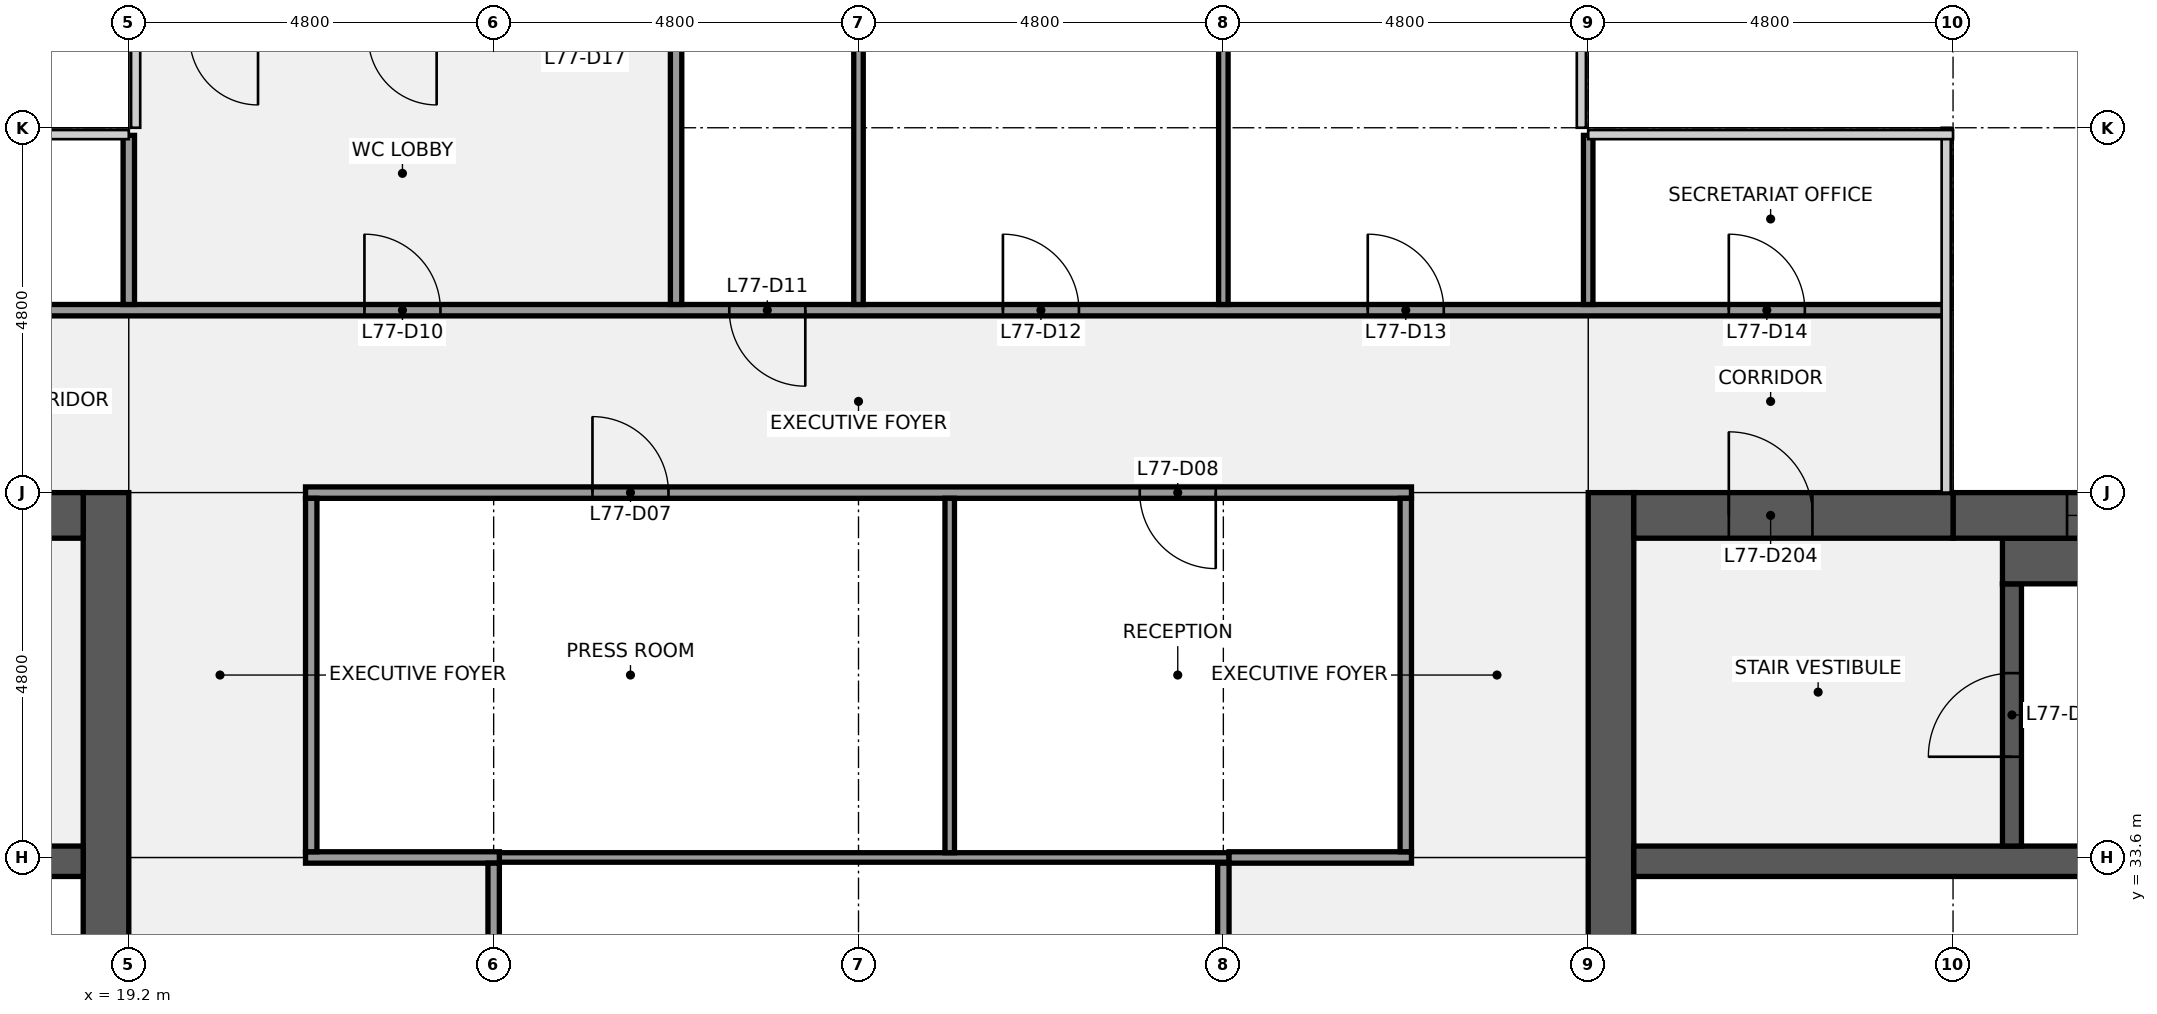
"""IFC4 building model, lengths in metres.
Left out: names, types, materials, properties, quantities, classifications, styles, units other than length and angle.
Written with IfcOpenShell. Run it as: python <this file> out.ifc"""

import sys

from ifc_helpers import new_model, si_unit, direction, frame, frame_2d, origin, place, context, subcontext, project, spatial, rectangle, extrude, element, fill, save


model = new_model("IFC4")
c1 = context("Model", 3, precision=1e-05, world=origin(), true_north=direction((0.0, 1.0)))
c2 = subcontext(c1, "Body", "Model", "MODEL_VIEW")
j1 = project(units=[si_unit("LENGTHUNIT", "METRE"), si_unit("PLANEANGLEUNIT", "RADIAN")], contexts=[c1])
p1 = place(None, origin())
s1 = spatial("IfcSite", under=j1, at=p1, CompositionType="ELEMENT")
p2 = place(p1, origin())
s2 = spatial("IfcBuilding", under=s1, at=p2, CompositionType="ELEMENT")
p3 = place(p2, frame((0.0, 0.0, 346.3)))
s3 = spatial("IfcBuildingStorey", under=s2, at=p3, CompositionType="ELEMENT", Elevation=346.3)
p4 = place(p3, frame((18.9, 38.4, 0.0), z_axis=(0.0, 0.0, 1.0), x_axis=(0.0, -1.0, 0.0)))
e1 = element("IfcWall", 1, at=p4, inside=s3, PredefinedType="SHEAR", context=c2, shape_type="SweptSolid", body=[
    extrude(rectangle(XDim=28.8, YDim=0.6, at=frame_2d((14.4, 0.0))), origin(), (0.0, 0.0, 1.0), 3.84),
])
p5 = place(p4, frame((18.3, 0.0, 0.0)))
e2 = element("IfcOpeningElement", 2, at=p5, cuts=e1, PredefinedType="OPENING", context=c2, shape_type="SweptSolid", body=[
    extrude(rectangle(XDim=1.8, YDim=2.1, at=frame_2d((0.9, 1.05))), frame((0.0, 0.31, 0.0), z_axis=(0.0, -1.0, 0.0), x_axis=(1.0, 0.0, 0.0)), (0.0, 0.0, 1.0), 0.62),
])
p6 = place(p4, frame((8.7, 0.0, 0.0)))
e3 = element("IfcOpeningElement", 3, at=p6, cuts=e1, PredefinedType="OPENING", context=c2, shape_type="SweptSolid", body=[
    extrude(rectangle(XDim=1.8, YDim=2.1, at=frame_2d((0.9, 1.05))), frame((0.0, 0.31, 0.0), z_axis=(0.0, -1.0, 0.0), x_axis=(1.0, 0.0, 0.0)), (0.0, 0.0, 1.0), 0.62),
])
p7 = place(p3, frame((0.6, 33.55, 0.0), z_axis=(0.0, 0.0, 1.0), x_axis=(1.0, 0.0, 0.0)))
e4 = element("IfcWall", 4, at=p7, inside=s3, PredefinedType="SHEAR", context=c2, shape_type="SweptSolid", body=[
    extrude(rectangle(XDim=18.0, YDim=0.4, at=frame_2d((9.0, 0.0))), origin(), (0.0, 0.0, 1.0), 3.84),
])
p8 = place(p3, frame((14.4, 38.1, 0.0), z_axis=(0.0, 0.0, 1.0), x_axis=(1.0, 0.0, 0.0)))
e5 = element("IfcWall", 5, at=p8, inside=s3, PredefinedType="SHEAR", context=c2, shape_type="SweptSolid", body=[
    extrude(rectangle(XDim=4.2, YDim=0.6, at=frame_2d((2.1, 0.0))), origin(), (0.0, 0.0, 1.0), 3.84),
])
p9 = place(p8, frame((1.85, 0.0, 0.0)))
e6 = element("IfcOpeningElement", 6, at=p9, cuts=e5, PredefinedType="OPENING", context=c2, shape_type="SweptSolid", body=[
    extrude(rectangle(XDim=1.1, YDim=2.1, at=frame_2d((0.55, 1.05))), frame((0.0, 0.31, 0.0), z_axis=(0.0, -1.0, 0.0), x_axis=(1.0, 0.0, 0.0)), (0.0, 0.0, 1.0), 0.62),
])
p10 = place(p3, frame((38.7, 9.6, 0.0), z_axis=(0.0, 0.0, 1.0), x_axis=(0.0, 1.0, 0.0)))
e7 = element("IfcWall", 7, at=p10, inside=s3, PredefinedType="SHEAR", context=c2, shape_type="SweptSolid", body=[
    extrude(rectangle(XDim=28.8, YDim=0.6, at=frame_2d((14.4, 0.0))), origin(), (0.0, 0.0, 1.0), 3.84),
])
p11 = place(p10, frame((8.7, 0.0, 0.0)))
e8 = element("IfcOpeningElement", 8, at=p11, cuts=e7, PredefinedType="OPENING", context=c2, shape_type="SweptSolid", body=[
    extrude(rectangle(XDim=1.8, YDim=2.1, at=frame_2d((0.9, 1.05))), frame((0.0, 0.31, 0.0), z_axis=(0.0, -1.0, 0.0), x_axis=(1.0, 0.0, 0.0)), (0.0, 0.0, 1.0), 0.62),
])
p12 = place(p10, frame((18.3, 0.0, 0.0)))
e9 = element("IfcOpeningElement", 9, at=p12, cuts=e7, PredefinedType="OPENING", context=c2, shape_type="SweptSolid", body=[
    extrude(rectangle(XDim=1.8, YDim=2.1, at=frame_2d((0.9, 1.05))), frame((0.0, 0.31, 0.0), z_axis=(0.0, -1.0, 0.0), x_axis=(1.0, 0.0, 0.0)), (0.0, 0.0, 1.0), 0.62),
])
p13 = place(p3, frame((39.0, 33.55, 0.0), z_axis=(0.0, 0.0, 1.0), x_axis=(1.0, 0.0, 0.0)))
e10 = element("IfcWall", 10, at=p13, inside=s3, PredefinedType="SHEAR", context=c2, shape_type="SweptSolid", body=[
    extrude(rectangle(XDim=18.0, YDim=0.4, at=frame_2d((9.0, 0.0))), origin(), (0.0, 0.0, 1.0), 3.84),
])
p14 = place(p3, frame((43.975, 33.75, 0.0), z_axis=(0.0, 0.0, 1.0), x_axis=(0.0, 1.0, 0.0)))
e11 = element("IfcWall", 11, at=p14, inside=s3, PredefinedType="SHEAR", context=c2, shape_type="SweptSolid", body=[
    extrude(rectangle(XDim=3.45, YDim=0.25, at=frame_2d((1.725, 0.0))), origin(), (0.0, 0.0, 1.0), 3.84),
])
p15 = place(p14, frame((1.175, 0.0, 0.0)))
e12 = element("IfcOpeningElement", 12, at=p15, cuts=e11, PredefinedType="OPENING", context=c2, shape_type="SweptSolid", body=[
    extrude(rectangle(XDim=1.1, YDim=2.1, at=frame_2d((0.55, 1.05))), frame((0.0, 0.135, 0.0), z_axis=(0.0, -1.0, 0.0), x_axis=(1.0, 0.0, 0.0)), (0.0, 0.0, 1.0), 0.27),
])
p16 = place(p3, frame((43.85, 37.5, 0.0), z_axis=(0.0, 0.0, 1.0), x_axis=(1.0, 0.0, 0.0)))
e13 = element("IfcWall", 13, at=p16, inside=s3, PredefinedType="SHEAR", context=c2, shape_type="SweptSolid", body=[
    extrude(rectangle(XDim=7.5, YDim=0.6, at=frame_2d((3.75, 0.0))), origin(), (0.0, 0.0, 1.0), 3.84),
])
p17 = place(p3, frame((43.2, 38.1, 0.0), z_axis=(0.0, 0.0, 1.0), x_axis=(1.0, 0.0, 0.0)))
e14 = element("IfcWall", 14, at=p17, inside=s3, PredefinedType="SHEAR", context=c2, shape_type="SweptSolid", body=[
    extrude(rectangle(XDim=13.8, YDim=0.6, at=frame_2d((6.9, 0.0))), origin(), (0.0, 0.0, 1.0), 3.84),
])
p18 = place(p17, frame((6.3, 0.0, 0.9)))
e15 = element("IfcOpeningElement", 15, at=p18, cuts=e14, PredefinedType="OPENING", context=c2, shape_type="SweptSolid", body=[
    extrude(rectangle(XDim=1.8, YDim=1.5, at=frame_2d((0.9, 0.75))), frame((0.0, 0.31, 0.0), z_axis=(0.0, -1.0, 0.0), x_axis=(1.0, 0.0, 0.0)), (0.0, 0.0, 1.0), 0.62),
])
p19 = place(p17, frame((1.5, 0.0, 0.9)))
e16 = element("IfcOpeningElement", 16, at=p19, cuts=e14, PredefinedType="OPENING", context=c2, shape_type="SweptSolid", body=[
    extrude(rectangle(XDim=1.8, YDim=1.5, at=frame_2d((0.9, 0.75))), frame((0.0, 0.31, 0.0), z_axis=(0.0, -1.0, 0.0), x_axis=(1.0, 0.0, 0.0)), (0.0, 0.0, 1.0), 0.62),
])
p20 = place(p3, frame((39.0, 38.1, 0.0), z_axis=(0.0, 0.0, 1.0), x_axis=(1.0, 0.0, 0.0)))
e17 = element("IfcWall", 17, at=p20, inside=s3, PredefinedType="SHEAR", context=c2, shape_type="SweptSolid", body=[
    extrude(rectangle(XDim=4.2, YDim=0.6, at=frame_2d((2.1, 0.0))), origin(), (0.0, 0.0, 1.0), 3.84),
])
p21 = place(p20, frame((1.25, 0.0, 0.0)))
e18 = element("IfcOpeningElement", 18, at=p21, cuts=e17, PredefinedType="OPENING", context=c2, shape_type="SweptSolid", body=[
    extrude(rectangle(XDim=1.1, YDim=2.1, at=frame_2d((0.55, 1.05))), frame((0.0, 0.31, 0.0), z_axis=(0.0, -1.0, 0.0), x_axis=(1.0, 0.0, 0.0)), (0.0, 0.0, 1.0), 0.62),
])
p22 = place(p3, frame((24.075, 33.6, 0.0), z_axis=(0.0, 0.0, 1.0), x_axis=(1.0, 0.0, 0.0)))
e19 = element("IfcWall", 19, at=p22, inside=s3, PredefinedType="PARTITIONING", context=c2, shape_type="SweptSolid", body=[
    extrude(rectangle(XDim=9.6, YDim=0.125, at=frame_2d((4.8, 0.0))), origin(), (0.0, 0.0, 1.0), 2.849),
])
p23 = place(p3, frame((21.525, 33.6, 0.0), z_axis=(0.0, 0.0, 1.0), x_axis=(1.0, 0.0, 0.0)))
e20 = element("IfcWall", 20, at=p23, inside=s3, PredefinedType="PARTITIONING", context=c2, shape_type="SweptSolid", body=[
    extrude(rectangle(XDim=2.55, YDim=0.15, at=frame_2d((1.275, 0.0))), origin(), (0.0, 0.0, 1.0), 2.849),
])
p24 = place(p3, frame((33.675, 33.6, 0.0), z_axis=(0.0, 0.0, 1.0), x_axis=(1.0, 0.0, 0.0)))
e21 = element("IfcWall", 21, at=p24, inside=s3, PredefinedType="PARTITIONING", context=c2, shape_type="SweptSolid", body=[
    extrude(rectangle(XDim=2.4, YDim=0.15, at=frame_2d((1.2, 0.0))), origin(), (0.0, 0.0, 1.0), 2.849),
])
p25 = place(p3, frame((21.525, 38.4, 0.0), z_axis=(0.0, 0.0, 1.0), x_axis=(1.0, 0.0, 0.0)))
e22 = element("IfcWall", 22, at=p25, inside=s3, PredefinedType="PARTITIONING", context=c2, shape_type="SweptSolid", body=[
    extrude(rectangle(XDim=14.55, YDim=0.15, at=frame_2d((7.275, 0.0))), origin(), (0.0, 0.0, 1.0), 2.849),
])
p26 = place(p25, frame((3.775, 0.0, 0.0)))
e23 = element("IfcOpeningElement", 23, at=p26, cuts=e22, PredefinedType="OPENING", context=c2, shape_type="SweptSolid", body=[
    extrude(rectangle(XDim=1.0, YDim=2.1, at=frame_2d((0.5, 1.05))), frame((0.0, 0.085, 0.0), z_axis=(0.0, -1.0, 0.0), x_axis=(1.0, 0.0, 0.0)), (0.0, 0.0, 1.0), 0.17),
])
p27 = place(p25, frame((10.975, 0.0, 0.0)))
e24 = element("IfcOpeningElement", 24, at=p27, cuts=e22, PredefinedType="OPENING", context=c2, shape_type="SweptSolid", body=[
    extrude(rectangle(XDim=1.0, YDim=2.1, at=frame_2d((0.5, 1.05))), frame((0.0, 0.085, 0.0), z_axis=(0.0, -1.0, 0.0), x_axis=(1.0, 0.0, 0.0)), (0.0, 0.0, 1.0), 0.17),
])
p28 = place(p3, frame((14.5, 40.8, 0.0), z_axis=(0.0, 0.0, 1.0), x_axis=(1.0, 0.0, 0.0)))
e25 = element("IfcWall", 25, at=p28, inside=s3, PredefinedType="PARTITIONING", context=c2, shape_type="SweptSolid", body=[
    extrude(rectangle(XDim=28.6, YDim=0.15, at=frame_2d((14.3, 0.0))), origin(), (0.0, 0.0, 1.0), 2.849),
])
p29 = place(p28, frame((1.85, 0.0, 0.0)))
e26 = element("IfcOpeningElement", 26, at=p29, cuts=e25, PredefinedType="OPENING", context=c2, shape_type="SweptSolid", body=[
    extrude(rectangle(XDim=1.0, YDim=2.1, at=frame_2d((0.5, 1.05))), frame((0.0, 0.085, 0.0), z_axis=(0.0, -1.0, 0.0), x_axis=(1.0, 0.0, 0.0)), (0.0, 0.0, 1.0), 0.17),
])
p30 = place(p28, frame((7.8, 0.0, 0.0)))
e27 = element("IfcOpeningElement", 27, at=p30, cuts=e25, PredefinedType="OPENING", context=c2, shape_type="SweptSolid", body=[
    extrude(rectangle(XDim=1.0, YDim=2.1, at=frame_2d((0.5, 1.05))), frame((0.0, 0.085, 0.0), z_axis=(0.0, -1.0, 0.0), x_axis=(1.0, 0.0, 0.0)), (0.0, 0.0, 1.0), 0.17),
])
p31 = place(p28, frame((12.6, 0.0, 0.0)))
e28 = element("IfcOpeningElement", 28, at=p31, cuts=e25, PredefinedType="OPENING", context=c2, shape_type="SweptSolid", body=[
    extrude(rectangle(XDim=1.0, YDim=2.1, at=frame_2d((0.5, 1.05))), frame((0.0, 0.085, 0.0), z_axis=(0.0, -1.0, 0.0), x_axis=(1.0, 0.0, 0.0)), (0.0, 0.0, 1.0), 0.17),
])
p32 = place(p28, frame((16.2, 0.0, 0.0)))
e29 = element("IfcOpeningElement", 29, at=p32, cuts=e25, PredefinedType="OPENING", context=c2, shape_type="SweptSolid", body=[
    extrude(rectangle(XDim=1.0, YDim=2.1, at=frame_2d((0.5, 1.05))), frame((0.0, 0.085, 0.0), z_axis=(0.0, -1.0, 0.0), x_axis=(1.0, 0.0, 0.0)), (0.0, 0.0, 1.0), 0.17),
])
p33 = place(p28, frame((21.0, 0.0, 0.0)))
e30 = element("IfcOpeningElement", 30, at=p33, cuts=e25, PredefinedType="OPENING", context=c2, shape_type="SweptSolid", body=[
    extrude(rectangle(XDim=1.0, YDim=2.1, at=frame_2d((0.5, 1.05))), frame((0.0, 0.085, 0.0), z_axis=(0.0, -1.0, 0.0), x_axis=(1.0, 0.0, 0.0)), (0.0, 0.0, 1.0), 0.17),
])
p34 = place(p28, frame((25.75, 0.0, 0.0)))
e31 = element("IfcOpeningElement", 31, at=p34, cuts=e25, PredefinedType="OPENING", context=c2, shape_type="SweptSolid", body=[
    extrude(rectangle(XDim=1.0, YDim=2.1, at=frame_2d((0.5, 1.05))), frame((0.0, 0.085, 0.0), z_axis=(0.0, -1.0, 0.0), x_axis=(1.0, 0.0, 0.0)), (0.0, 0.0, 1.0), 0.17),
])
p35 = place(p3, frame((19.2, 40.875, 0.0), z_axis=(0.0, 0.0, 1.0), x_axis=(0.0, 1.0, 0.0)))
e32 = element("IfcWall", 32, at=p35, inside=s3, PredefinedType="PARTITIONING", context=c2, shape_type="SweptSolid", body=[
    extrude(rectangle(XDim=2.225, YDim=0.15, at=frame_2d((1.113, 0.0))), origin(), (0.0, 0.0, 1.0), 2.849),
])
p36 = place(p3, frame((21.6, 33.675, 0.0), z_axis=(0.0, 0.0, 1.0), x_axis=(0.0, 1.0, 0.0)))
e33 = element("IfcWall", 33, at=p36, inside=s3, PredefinedType="PARTITIONING", context=c2, shape_type="SweptSolid", body=[
    extrude(rectangle(XDim=4.65, YDim=0.15, at=frame_2d((2.325, 0.0))), origin(), (0.0, 0.0, 1.0), 2.849),
])
p37 = place(p3, frame((24.0, 24.075, 0.0), z_axis=(0.0, 0.0, 1.0), x_axis=(0.0, 1.0, 0.0)))
e34 = element("IfcWall", 34, at=p37, inside=s3, PredefinedType="PARTITIONING", context=c2, shape_type="SweptSolid", body=[
    extrude(rectangle(XDim=9.45, YDim=0.15, at=frame_2d((4.725, 0.0))), origin(), (0.0, 0.0, 1.0), 2.849),
])
p38 = place(p37, frame((4.225, 0.0, 0.0)))
e35 = element("IfcOpeningElement", 35, at=p38, cuts=e34, PredefinedType="OPENING", context=c2, shape_type="SweptSolid", body=[
    extrude(rectangle(XDim=1.0, YDim=2.1, at=frame_2d((0.5, 1.05))), frame((0.0, 0.085, 0.0), z_axis=(0.0, -1.0, 0.0), x_axis=(1.0, 0.0, 0.0)), (0.0, 0.0, 1.0), 0.17),
])
p39 = place(p3, frame((26.4, 40.875, 0.0), z_axis=(0.0, 0.0, 1.0), x_axis=(0.0, 1.0, 0.0)))
e36 = element("IfcWall", 36, at=p39, inside=s3, PredefinedType="PARTITIONING", context=c2, shape_type="SweptSolid", body=[
    extrude(rectangle(XDim=3.45, YDim=0.15, at=frame_2d((1.725, 0.0))), origin(), (0.0, 0.0, 1.0), 2.849),
])
p40 = place(p3, frame((28.8, 40.875, 0.0), z_axis=(0.0, 0.0, 1.0), x_axis=(0.0, 1.0, 0.0)))
e37 = element("IfcWall", 37, at=p40, inside=s3, PredefinedType="PARTITIONING", context=c2, shape_type="SweptSolid", body=[
    extrude(rectangle(XDim=6.625, YDim=0.125, at=frame_2d((3.312, 0.0))), origin(), (0.0, 0.0, 1.0), 2.849),
])
p41 = place(p3, frame((30.0, 33.663, 0.0), z_axis=(0.0, 0.0, 1.0), x_axis=(0.0, 1.0, 0.0)))
e38 = element("IfcWall", 38, at=p41, inside=s3, PredefinedType="PARTITIONING", context=c2, shape_type="SweptSolid", body=[
    extrude(rectangle(XDim=4.662, YDim=0.125, at=frame_2d((2.331, 0.0))), origin(), (0.0, 0.0, 1.0), 2.849),
])
p42 = place(p3, frame((33.6, 40.875, 0.0), z_axis=(0.0, 0.0, 1.0), x_axis=(0.0, 1.0, 0.0)))
e39 = element("IfcWall", 39, at=p42, inside=s3, PredefinedType="PARTITIONING", context=c2, shape_type="SweptSolid", body=[
    extrude(rectangle(XDim=7.025, YDim=0.125, at=frame_2d((3.512, 0.0))), origin(), (0.0, 0.0, 1.0), 2.849),
])
p43 = place(p3, frame((33.6, 24.075, 0.0), z_axis=(0.0, 0.0, 1.0), x_axis=(0.0, 1.0, 0.0)))
e40 = element("IfcWall", 40, at=p43, inside=s3, PredefinedType="PARTITIONING", context=c2, shape_type="SweptSolid", body=[
    extrude(rectangle(XDim=9.45, YDim=0.15, at=frame_2d((4.725, 0.0))), origin(), (0.0, 0.0, 1.0), 2.849),
])
p44 = place(p3, frame((36.0, 33.675, 0.0), z_axis=(0.0, 0.0, 1.0), x_axis=(0.0, 1.0, 0.0)))
e41 = element("IfcWall", 41, at=p44, inside=s3, PredefinedType="PARTITIONING", context=c2, shape_type="SweptSolid", body=[
    extrude(rectangle(XDim=4.65, YDim=0.15, at=frame_2d((2.325, 0.0))), origin(), (0.0, 0.0, 1.0), 2.849),
])
p45 = place(p3, frame((38.4, 40.875, 0.0), z_axis=(0.0, 0.0, 1.0), x_axis=(0.0, 1.0, 0.0)))
e42 = element("IfcWall", 42, at=p45, inside=s3, PredefinedType="PARTITIONING", context=c2, shape_type="SweptSolid", body=[
    extrude(rectangle(XDim=2.225, YDim=0.125, at=frame_2d((1.113, 0.0))), origin(), (0.0, 0.0, 1.0), 2.849),
])
p46 = place(p15, origin())
e43 = element("IfcDoor", 43, at=p46, inside=s3, OperationType="SINGLE_SWING_LEFT", PredefinedType="DOOR", context=c2, shape_type="SweptSolid", body=[
    extrude(rectangle(XDim=1.1, YDim=2.1, at=frame_2d((0.55, 1.05))), frame((0.0, 0.025, 0.0), z_axis=(0.0, -1.0, 0.0), x_axis=(1.0, 0.0, 0.0)), (0.0, 0.0, 1.0), 0.05),
])
fill(e12, e43)
p47 = place(p21, origin())
e44 = element("IfcDoor", 44, at=p47, inside=s3, OperationType="SINGLE_SWING_LEFT", PredefinedType="DOOR", context=c2, shape_type="SweptSolid", body=[
    extrude(rectangle(XDim=1.1, YDim=2.1, at=frame_2d((0.55, 1.05))), frame((0.0, 0.025, 0.0), z_axis=(0.0, -1.0, 0.0), x_axis=(1.0, 0.0, 0.0)), (0.0, 0.0, 1.0), 0.05),
])
fill(e18, e44)
p48 = place(p19, origin())
e45 = element("IfcWindow", 45, at=p48, inside=s3, PartitioningType="SINGLE_PANEL", PredefinedType="WINDOW", context=c2, shape_type="SweptSolid", body=[
    extrude(rectangle(XDim=1.8, YDim=1.5, at=frame_2d((0.9, 0.75))), frame((0.0, 0.03, 0.0), z_axis=(0.0, -1.0, 0.0), x_axis=(1.0, 0.0, 0.0)), (0.0, 0.0, 1.0), 0.06),
])
fill(e16, e45)
p49 = place(p26, origin())
e46 = element("IfcDoor", 46, at=p49, inside=s3, OperationType="SINGLE_SWING_LEFT", PredefinedType="DOOR", context=c2, shape_type="SweptSolid", body=[
    extrude(rectangle(XDim=1.0, YDim=2.1, at=frame_2d((0.5, 1.05))), frame((0.0, 0.025, 0.0), z_axis=(0.0, -1.0, 0.0), x_axis=(1.0, 0.0, 0.0)), (0.0, 0.0, 1.0), 0.05),
])
fill(e23, e46)
p50 = place(p27, origin())
e47 = element("IfcDoor", 47, at=p50, inside=s3, OperationType="SINGLE_SWING_RIGHT", PredefinedType="DOOR", context=c2, shape_type="SweptSolid", body=[
    extrude(rectangle(XDim=1.0, YDim=2.1, at=frame_2d((0.5, 1.05))), frame((0.0, 0.025, 0.0), z_axis=(0.0, -1.0, 0.0), x_axis=(1.0, 0.0, 0.0)), (0.0, 0.0, 1.0), 0.05),
])
fill(e24, e47)
p51 = place(p30, origin())
e48 = element("IfcDoor", 48, at=p51, inside=s3, OperationType="SINGLE_SWING_LEFT", PredefinedType="DOOR", context=c2, shape_type="SweptSolid", body=[
    extrude(rectangle(XDim=1.0, YDim=2.1, at=frame_2d((0.5, 1.05))), frame((0.0, 0.025, 0.0), z_axis=(0.0, -1.0, 0.0), x_axis=(1.0, 0.0, 0.0)), (0.0, 0.0, 1.0), 0.05),
])
fill(e27, e48)
p52 = place(p31, origin())
e49 = element("IfcDoor", 49, at=p52, inside=s3, OperationType="SINGLE_SWING_RIGHT", PredefinedType="DOOR", context=c2, shape_type="SweptSolid", body=[
    extrude(rectangle(XDim=1.0, YDim=2.1, at=frame_2d((0.5, 1.05))), frame((0.0, 0.025, 0.0), z_axis=(0.0, -1.0, 0.0), x_axis=(1.0, 0.0, 0.0)), (0.0, 0.0, 1.0), 0.05),
])
fill(e28, e49)
p53 = place(p32, origin())
e50 = element("IfcDoor", 50, at=p53, inside=s3, OperationType="SINGLE_SWING_LEFT", PredefinedType="DOOR", context=c2, shape_type="SweptSolid", body=[
    extrude(rectangle(XDim=1.0, YDim=2.1, at=frame_2d((0.5, 1.05))), frame((0.0, 0.025, 0.0), z_axis=(0.0, -1.0, 0.0), x_axis=(1.0, 0.0, 0.0)), (0.0, 0.0, 1.0), 0.05),
])
fill(e29, e50)
p54 = place(p33, origin())
e51 = element("IfcDoor", 51, at=p54, inside=s3, OperationType="SINGLE_SWING_LEFT", PredefinedType="DOOR", context=c2, shape_type="SweptSolid", body=[
    extrude(rectangle(XDim=1.0, YDim=2.1, at=frame_2d((0.5, 1.05))), frame((0.0, 0.025, 0.0), z_axis=(0.0, -1.0, 0.0), x_axis=(1.0, 0.0, 0.0)), (0.0, 0.0, 1.0), 0.05),
])
fill(e30, e51)
p55 = place(p34, origin())
e52 = element("IfcDoor", 52, at=p55, inside=s3, OperationType="SINGLE_SWING_LEFT", PredefinedType="DOOR", context=c2, shape_type="SweptSolid", body=[
    extrude(rectangle(XDim=1.0, YDim=2.1, at=frame_2d((0.5, 1.05))), frame((0.0, 0.025, 0.0), z_axis=(0.0, -1.0, 0.0), x_axis=(1.0, 0.0, 0.0)), (0.0, 0.0, 1.0), 0.05),
])
fill(e31, e52)
save(model, sys.argv[1])
